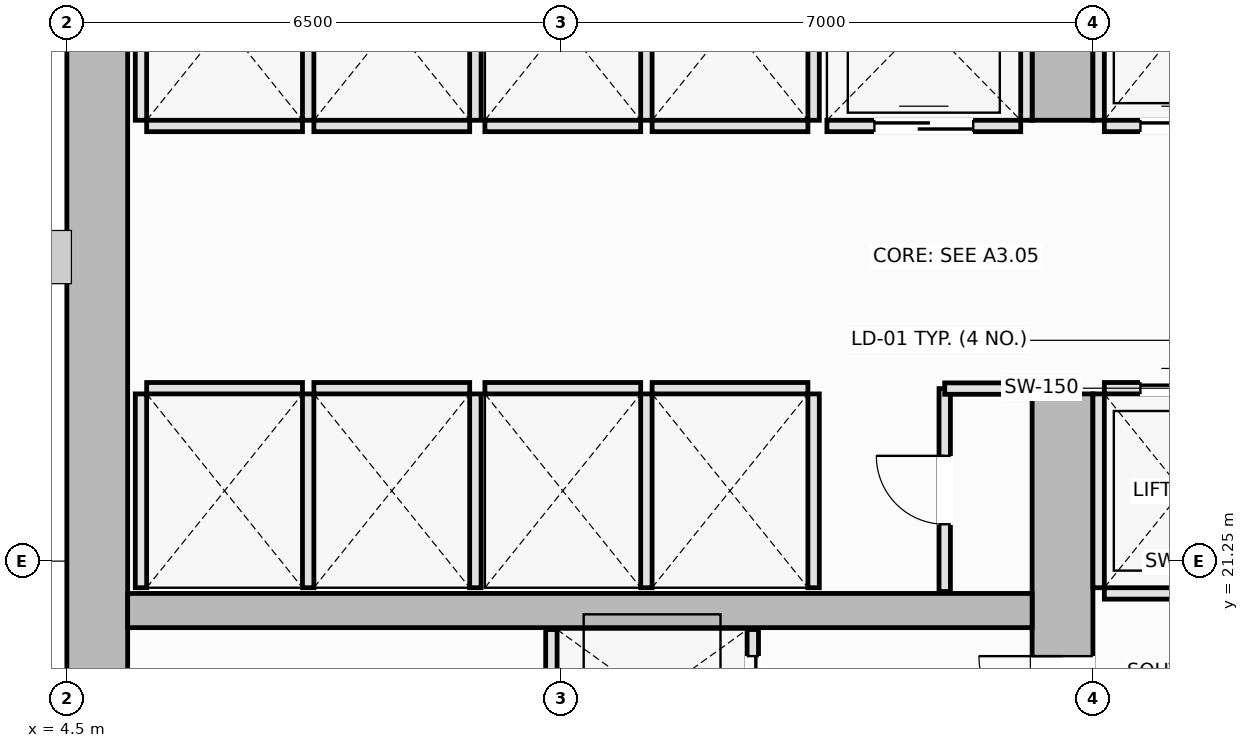
"""IFC4 building model, lengths in metres.
Left out: names, types, materials, properties, quantities, classifications, styles, units other than length and angle.
Written with IfcOpenShell. Run it as: python <this file> out.ifc"""

import sys

from ifc_helpers import new_model, si_unit, direction, frame, frame_2d, origin, place, context, subcontext, project, spatial, rectangle, extrude, element, fill, save


model = new_model("IFC4")
c1 = context("Model", 3, precision=1e-05, world=origin(), true_north=direction((0.0, 1.0)))
c2 = subcontext(c1, "Body", "Model", "MODEL_VIEW")
j1 = project(units=[si_unit("LENGTHUNIT", "METRE"), si_unit("PLANEANGLEUNIT", "RADIAN")], contexts=[c1])
p1 = place(None, origin())
s1 = spatial("IfcSite", under=j1, at=p1, CompositionType="ELEMENT")
p2 = place(p1, origin())
s2 = spatial("IfcBuilding", under=s1, at=p2, CompositionType="ELEMENT")
p3 = place(p2, frame((0.0, 0.0, 75.3)))
s3 = spatial("IfcBuildingStorey", under=s2, at=p3, CompositionType="ELEMENT", Elevation=75.3)
p4 = place(p3, frame((4.9, 14.8, 0.0), z_axis=(0.0, 0.0, 1.0), x_axis=(0.0, 1.0, 0.0)))
e1 = element("IfcWall", 1, at=p4, inside=s3, PredefinedType="SHEAR", context=c2, shape_type="SweptSolid", body=[
    extrude(rectangle(XDim=20.9, YDim=0.8, at=frame_2d((10.45, 0.0))), origin(), (0.0, 0.0, 1.0), 3.55),
])
p5 = place(p3, frame((17.6, 14.8, 0.0), z_axis=(0.0, 0.0, 1.0), x_axis=(0.0, 1.0, 0.0)))
e2 = element("IfcWall", 2, at=p5, inside=s3, PredefinedType="SHEAR", context=c2, shape_type="SweptSolid", body=[
    extrude(rectangle(XDim=8.65, YDim=0.8, at=frame_2d((4.325, 0.0))), origin(), (0.0, 0.0, 1.0), 3.55),
])
p6 = place(p5, frame((4.1, 0.0, 0.0)))
e3 = element("IfcOpeningElement", 3, at=p6, cuts=e2, PredefinedType="OPENING", context=c2, shape_type="SweptSolid", body=[
    extrude(rectangle(XDim=1.1, YDim=2.15, at=frame_2d((0.55, 1.075))), frame((0.0, 0.41, 0.0), z_axis=(0.0, -1.0, 0.0), x_axis=(1.0, 0.0, 0.0)), (0.0, 0.0, 1.0), 0.82),
])
p7 = place(p3, frame((17.6, 27.05, 0.0), z_axis=(0.0, 0.0, 1.0), x_axis=(0.0, 1.0, 0.0)))
e4 = element("IfcWall", 4, at=p7, inside=s3, PredefinedType="SHEAR", context=c2, shape_type="SweptSolid", body=[
    extrude(rectangle(XDim=8.65, YDim=0.8, at=frame_2d((4.325, 0.0))), origin(), (0.0, 0.0, 1.0), 3.55),
])
p8 = place(p7, frame((3.45, 0.0, 0.0)))
e5 = element("IfcOpeningElement", 5, at=p8, cuts=e4, PredefinedType="OPENING", context=c2, shape_type="SweptSolid", body=[
    extrude(rectangle(XDim=1.1, YDim=2.15, at=frame_2d((0.55, 1.075))), frame((0.0, 0.41, 0.0), z_axis=(0.0, -1.0, 0.0), x_axis=(1.0, 0.0, 0.0)), (0.0, 0.0, 1.0), 0.82),
])
p9 = place(p3, frame((5.3, 20.6, 0.0), z_axis=(0.0, 0.0, 1.0), x_axis=(1.0, 0.0, 0.0)))
e6 = element("IfcWall", 6, at=p9, inside=s3, PredefinedType="SHEAR", context=c2, shape_type="SweptSolid", body=[
    extrude(rectangle(XDim=11.9, YDim=0.45, at=frame_2d((5.95, 0.0))), origin(), (0.0, 0.0, 1.0), 3.55),
])
p10 = place(p3, frame((18.15, 20.825, 0.0), z_axis=(0.0, 0.0, 1.0), x_axis=(1.0, 0.0, 0.0)))
e7 = element("IfcWall", 7, at=p10, inside=s3, PredefinedType="PARTITIONING", context=c2, shape_type="SweptSolid", body=[
    extrude(rectangle(XDim=2.05, YDim=0.15, at=frame_2d((1.025, 0.0))), origin(), (0.0, 0.0, 1.0), 3.37),
])
p11 = place(p3, frame((18.15, 23.525, 0.0), z_axis=(0.0, 0.0, 1.0), x_axis=(1.0, 0.0, 0.0)))
e8 = element("IfcWall", 8, at=p11, inside=s3, PredefinedType="PARTITIONING", context=c2, shape_type="SweptSolid", body=[
    extrude(rectangle(XDim=2.05, YDim=0.15, at=frame_2d((1.025, 0.0))), origin(), (0.0, 0.0, 1.0), 3.37),
])
p12 = place(p11, frame((0.475, 0.0, 0.0)))
e9 = element("IfcOpeningElement", 9, at=p12, cuts=e8, PredefinedType="OPENING", context=c2, shape_type="SweptSolid", body=[
    extrude(rectangle(XDim=1.1, YDim=2.2, at=frame_2d((0.55, 1.1))), frame((0.0, 0.085, 0.0), z_axis=(0.0, -1.0, 0.0), x_axis=(1.0, 0.0, 0.0)), (0.0, 0.0, 1.0), 0.17),
])
p13 = place(p3, frame((18.075, 20.9, 0.0), z_axis=(0.0, 0.0, 1.0), x_axis=(0.0, 1.0, 0.0)))
e10 = element("IfcWall", 10, at=p13, inside=s3, PredefinedType="PARTITIONING", context=c2, shape_type="SweptSolid", body=[
    extrude(rectangle(XDim=2.55, YDim=0.15, at=frame_2d((1.275, 0.0))), origin(), (0.0, 0.0, 1.0), 3.37),
])
p14 = place(p3, frame((18.15, 26.975, 0.0), z_axis=(0.0, 0.0, 1.0), x_axis=(1.0, 0.0, 0.0)))
e11 = element("IfcWall", 11, at=p14, inside=s3, PredefinedType="PARTITIONING", context=c2, shape_type="SweptSolid", body=[
    extrude(rectangle(XDim=2.05, YDim=0.15, at=frame_2d((1.025, 0.0))), origin(), (0.0, 0.0, 1.0), 3.37),
])
p15 = place(p14, frame((0.475, 0.0, 0.0)))
e12 = element("IfcOpeningElement", 12, at=p15, cuts=e11, PredefinedType="OPENING", context=c2, shape_type="SweptSolid", body=[
    extrude(rectangle(XDim=1.1, YDim=2.2, at=frame_2d((0.55, 1.1))), frame((0.0, 0.085, 0.0), z_axis=(0.0, -1.0, 0.0), x_axis=(1.0, 0.0, 0.0)), (0.0, 0.0, 1.0), 0.17),
])
p16 = place(p3, frame((18.075, 27.05, 0.0), z_axis=(0.0, 0.0, 1.0), x_axis=(0.0, 1.0, 0.0)))
e13 = element("IfcWall", 13, at=p16, inside=s3, PredefinedType="PARTITIONING", context=c2, shape_type="SweptSolid", body=[
    extrude(rectangle(XDim=2.55, YDim=0.15, at=frame_2d((1.275, 0.0))), origin(), (0.0, 0.0, 1.0), 3.37),
])
p17 = place(p3, frame((5.55, 23.525, 0.0), z_axis=(0.0, 0.0, 1.0), x_axis=(1.0, 0.0, 0.0)))
e14 = element("IfcWall", 14, at=p17, inside=s3, PredefinedType="PARTITIONING", context=c2, shape_type="SweptSolid", body=[
    extrude(rectangle(XDim=2.05, YDim=0.15, at=frame_2d((1.025, 0.0))), origin(), (0.0, 0.0, 1.0), 3.37),
])
for number, where, z_axis, x_axis in (
    (15, (5.475, 20.9, 0.0), (0.0, 0.0, 1.0), (0.0, 1.0, 0.0)),
    (16, (7.675, 20.9, 0.0), (0.0, 0.0, 1.0), (0.0, 1.0, 0.0)),
):
    element("IfcWall", number, at=place(p3, frame(where, z_axis=z_axis, x_axis=x_axis)), inside=s3, PredefinedType="PARTITIONING", context=c2, shape_type="SweptSolid", body=[
        extrude(rectangle(XDim=2.55, YDim=0.15, at=frame_2d((1.275, 0.0))), origin(), (0.0, 0.0, 1.0), 3.37),
    ])
p18 = place(p3, frame((7.75, 23.525, 0.0), z_axis=(0.0, 0.0, 1.0), x_axis=(1.0, 0.0, 0.0)))
e17 = element("IfcWall", 17, at=p18, inside=s3, PredefinedType="PARTITIONING", context=c2, shape_type="SweptSolid", body=[
    extrude(rectangle(XDim=2.05, YDim=0.15, at=frame_2d((1.025, 0.0))), origin(), (0.0, 0.0, 1.0), 3.37),
])
p19 = place(p3, frame((9.875, 20.9, 0.0), z_axis=(0.0, 0.0, 1.0), x_axis=(0.0, 1.0, 0.0)))
e18 = element("IfcWall", 18, at=p19, inside=s3, PredefinedType="PARTITIONING", context=c2, shape_type="SweptSolid", body=[
    extrude(rectangle(XDim=2.55, YDim=0.15, at=frame_2d((1.275, 0.0))), origin(), (0.0, 0.0, 1.0), 3.37),
])
p20 = place(p3, frame((5.55, 26.975, 0.0), z_axis=(0.0, 0.0, 1.0), x_axis=(1.0, 0.0, 0.0)))
e19 = element("IfcWall", 19, at=p20, inside=s3, PredefinedType="PARTITIONING", context=c2, shape_type="SweptSolid", body=[
    extrude(rectangle(XDim=2.05, YDim=0.15, at=frame_2d((1.025, 0.0))), origin(), (0.0, 0.0, 1.0), 3.37),
])
for number, where, z_axis, x_axis in (
    (20, (5.475, 27.05, 0.0), (0.0, 0.0, 1.0), (0.0, 1.0, 0.0)),
    (21, (7.675, 27.05, 0.0), (0.0, 0.0, 1.0), (0.0, 1.0, 0.0)),
):
    element("IfcWall", number, at=place(p3, frame(where, z_axis=z_axis, x_axis=x_axis)), inside=s3, PredefinedType="PARTITIONING", context=c2, shape_type="SweptSolid", body=[
        extrude(rectangle(XDim=2.55, YDim=0.15, at=frame_2d((1.275, 0.0))), origin(), (0.0, 0.0, 1.0), 3.37),
    ])
p21 = place(p3, frame((7.75, 26.975, 0.0), z_axis=(0.0, 0.0, 1.0), x_axis=(1.0, 0.0, 0.0)))
e22 = element("IfcWall", 22, at=p21, inside=s3, PredefinedType="PARTITIONING", context=c2, shape_type="SweptSolid", body=[
    extrude(rectangle(XDim=2.05, YDim=0.15, at=frame_2d((1.025, 0.0))), origin(), (0.0, 0.0, 1.0), 3.37),
])
p22 = place(p3, frame((9.875, 27.05, 0.0), z_axis=(0.0, 0.0, 1.0), x_axis=(0.0, 1.0, 0.0)))
e23 = element("IfcWall", 23, at=p22, inside=s3, PredefinedType="PARTITIONING", context=c2, shape_type="SweptSolid", body=[
    extrude(rectangle(XDim=2.55, YDim=0.15, at=frame_2d((1.275, 0.0))), origin(), (0.0, 0.0, 1.0), 3.37),
])
p23 = place(p3, frame((10.0, 23.525, 0.0), z_axis=(0.0, 0.0, 1.0), x_axis=(1.0, 0.0, 0.0)))
e24 = element("IfcWall", 24, at=p23, inside=s3, PredefinedType="PARTITIONING", context=c2, shape_type="SweptSolid", body=[
    extrude(rectangle(XDim=2.05, YDim=0.15, at=frame_2d((1.025, 0.0))), origin(), (0.0, 0.0, 1.0), 3.37),
])
p24 = place(p3, frame((12.125, 20.9, 0.0), z_axis=(0.0, 0.0, 1.0), x_axis=(0.0, 1.0, 0.0)))
e25 = element("IfcWall", 25, at=p24, inside=s3, PredefinedType="PARTITIONING", context=c2, shape_type="SweptSolid", body=[
    extrude(rectangle(XDim=2.55, YDim=0.15, at=frame_2d((1.275, 0.0))), origin(), (0.0, 0.0, 1.0), 3.37),
])
p25 = place(p3, frame((12.2, 23.525, 0.0), z_axis=(0.0, 0.0, 1.0), x_axis=(1.0, 0.0, 0.0)))
e26 = element("IfcWall", 26, at=p25, inside=s3, PredefinedType="PARTITIONING", context=c2, shape_type="SweptSolid", body=[
    extrude(rectangle(XDim=2.05, YDim=0.15, at=frame_2d((1.025, 0.0))), origin(), (0.0, 0.0, 1.0), 3.37),
])
p26 = place(p3, frame((14.325, 20.9, 0.0), z_axis=(0.0, 0.0, 1.0), x_axis=(0.0, 1.0, 0.0)))
e27 = element("IfcWall", 27, at=p26, inside=s3, PredefinedType="PARTITIONING", context=c2, shape_type="SweptSolid", body=[
    extrude(rectangle(XDim=2.55, YDim=0.15, at=frame_2d((1.275, 0.0))), origin(), (0.0, 0.0, 1.0), 3.37),
])
p27 = place(p3, frame((10.0, 26.975, 0.0), z_axis=(0.0, 0.0, 1.0), x_axis=(1.0, 0.0, 0.0)))
e28 = element("IfcWall", 28, at=p27, inside=s3, PredefinedType="PARTITIONING", context=c2, shape_type="SweptSolid", body=[
    extrude(rectangle(XDim=2.05, YDim=0.15, at=frame_2d((1.025, 0.0))), origin(), (0.0, 0.0, 1.0), 3.37),
])
p28 = place(p3, frame((12.125, 27.05, 0.0), z_axis=(0.0, 0.0, 1.0), x_axis=(0.0, 1.0, 0.0)))
e29 = element("IfcWall", 29, at=p28, inside=s3, PredefinedType="PARTITIONING", context=c2, shape_type="SweptSolid", body=[
    extrude(rectangle(XDim=2.55, YDim=0.15, at=frame_2d((1.275, 0.0))), origin(), (0.0, 0.0, 1.0), 3.37),
])
p29 = place(p3, frame((12.2, 26.975, 0.0), z_axis=(0.0, 0.0, 1.0), x_axis=(1.0, 0.0, 0.0)))
e30 = element("IfcWall", 30, at=p29, inside=s3, PredefinedType="PARTITIONING", context=c2, shape_type="SweptSolid", body=[
    extrude(rectangle(XDim=2.05, YDim=0.15, at=frame_2d((1.025, 0.0))), origin(), (0.0, 0.0, 1.0), 3.37),
])
p30 = place(p3, frame((14.325, 27.05, 0.0), z_axis=(0.0, 0.0, 1.0), x_axis=(0.0, 1.0, 0.0)))
e31 = element("IfcWall", 31, at=p30, inside=s3, PredefinedType="PARTITIONING", context=c2, shape_type="SweptSolid", body=[
    extrude(rectangle(XDim=2.55, YDim=0.15, at=frame_2d((1.275, 0.0))), origin(), (0.0, 0.0, 1.0), 3.37),
])
p31 = place(p3, frame((14.5, 26.975, 0.0), z_axis=(0.0, 0.0, 1.0), x_axis=(1.0, 0.0, 0.0)))
e32 = element("IfcWall", 32, at=p31, inside=s3, PredefinedType="PARTITIONING", context=c2, shape_type="SweptSolid", body=[
    extrude(rectangle(XDim=2.55, YDim=0.15, at=frame_2d((1.275, 0.0))), origin(), (0.0, 0.0, 1.0), 3.37),
])
p32 = place(p31, frame((0.625, 0.0, 0.0)))
e33 = element("IfcOpeningElement", 33, at=p32, cuts=e32, PredefinedType="OPENING", context=c2, shape_type="SweptSolid", body=[
    extrude(rectangle(XDim=1.3, YDim=2.2, at=frame_2d((0.65, 1.1))), frame((0.0, 0.085, 0.0), z_axis=(0.0, -1.0, 0.0), x_axis=(1.0, 0.0, 0.0)), (0.0, 0.0, 1.0), 0.17),
])
p33 = place(p3, frame((17.125, 27.05, 0.0), z_axis=(0.0, 0.0, 1.0), x_axis=(0.0, 1.0, 0.0)))
e34 = element("IfcWall", 34, at=p33, inside=s3, PredefinedType="PARTITIONING", context=c2, shape_type="SweptSolid", body=[
    extrude(rectangle(XDim=2.6, YDim=0.15, at=frame_2d((1.3, 0.0))), origin(), (0.0, 0.0, 1.0), 3.37),
])
p34 = place(p3, frame((10.875, 18.55, 0.0), z_axis=(0.0, 0.0, 1.0), x_axis=(0.0, 1.0, 0.0)))
e35 = element("IfcWall", 35, at=p34, inside=s3, PredefinedType="PARTITIONING", context=c2, shape_type="SweptSolid", body=[
    extrude(rectangle(XDim=1.8, YDim=0.15, at=frame_2d((0.9, 0.0))), origin(), (0.0, 0.0, 1.0), 3.37),
])
p35 = place(p3, frame((13.525, 18.55, 0.0), z_axis=(0.0, 0.0, 1.0), x_axis=(0.0, 1.0, 0.0)))
e36 = element("IfcWall", 36, at=p35, inside=s3, PredefinedType="PARTITIONING", context=c2, shape_type="SweptSolid", body=[
    extrude(rectangle(XDim=1.8, YDim=0.15, at=frame_2d((0.9, 0.0))), origin(), (0.0, 0.0, 1.0), 3.37),
])
p36 = place(p35, frame((0.35, 0.0, 0.0)))
e37 = element("IfcOpeningElement", 37, at=p36, cuts=e36, PredefinedType="OPENING", context=c2, shape_type="SweptSolid", body=[
    extrude(rectangle(XDim=1.1, YDim=2.2, at=frame_2d((0.55, 1.1))), frame((0.0, 0.085, 0.0), z_axis=(0.0, -1.0, 0.0), x_axis=(1.0, 0.0, 0.0)), (0.0, 0.0, 1.0), 0.17),
])
p37 = place(p3, frame((16.05, 20.85, 0.0), z_axis=(0.0, 0.0, 1.0), x_axis=(0.0, 1.0, 0.0)))
e38 = element("IfcWall", 38, at=p37, inside=s3, PredefinedType="PARTITIONING", context=c2, shape_type="SweptSolid", body=[
    extrude(rectangle(XDim=2.67, YDim=0.15, at=frame_2d((1.335, 0.0))), origin(), (0.0, 0.0, 1.0), 3.37),
])
p38 = place(p37, frame((0.885, 0.0, 0.0)))
e39 = element("IfcOpeningElement", 39, at=p38, cuts=e38, PredefinedType="OPENING", context=c2, shape_type="SweptSolid", body=[
    extrude(rectangle(XDim=0.9, YDim=2.1, at=frame_2d((0.45, 1.05))), frame((0.0, 0.085, 0.0), z_axis=(0.0, -1.0, 0.0), x_axis=(1.0, 0.0, 0.0)), (0.0, 0.0, 1.0), 0.17),
])
p39 = place(p3, frame((16.05, 23.52, 0.0), z_axis=(0.0, 0.0, 1.0), x_axis=(1.0, 0.0, 0.0)))
e40 = element("IfcWall", 40, at=p39, inside=s3, PredefinedType="PARTITIONING", context=c2, shape_type="SweptSolid", body=[
    extrude(rectangle(XDim=1.17, YDim=0.15, at=frame_2d((0.585, 0.0))), origin(), (0.0, 0.0, 1.0), 3.37),
])
p40 = place(p12, origin())
e41 = element("IfcDoor", 41, at=p40, inside=s3, OperationType="DOUBLE_DOOR_SLIDING", PredefinedType="DOOR", context=c2, shape_type="SweptSolid", body=[
    extrude(rectangle(XDim=1.1, YDim=2.2, at=frame_2d((0.55, 1.1))), frame((0.0, 0.025, 0.0), z_axis=(0.0, -1.0, 0.0), x_axis=(1.0, 0.0, 0.0)), (0.0, 0.0, 1.0), 0.05),
])
fill(e9, e41)
p41 = place(p15, origin())
e42 = element("IfcDoor", 42, at=p41, inside=s3, OperationType="DOUBLE_DOOR_SLIDING", PredefinedType="DOOR", context=c2, shape_type="SweptSolid", body=[
    extrude(rectangle(XDim=1.1, YDim=2.2, at=frame_2d((0.55, 1.1))), frame((0.0, 0.025, 0.0), z_axis=(0.0, -1.0, 0.0), x_axis=(1.0, 0.0, 0.0)), (0.0, 0.0, 1.0), 0.05),
])
fill(e12, e42)
p42 = place(p32, origin())
e43 = element("IfcDoor", 43, at=p42, inside=s3, OperationType="DOUBLE_DOOR_SLIDING", PredefinedType="DOOR", context=c2, shape_type="SweptSolid", body=[
    extrude(rectangle(XDim=1.3, YDim=2.2, at=frame_2d((0.65, 1.1))), frame((0.0, 0.025, 0.0), z_axis=(0.0, -1.0, 0.0), x_axis=(1.0, 0.0, 0.0)), (0.0, 0.0, 1.0), 0.05),
])
fill(e33, e43)
p43 = place(p36, origin())
e44 = element("IfcDoor", 44, at=p43, inside=s3, OperationType="DOUBLE_DOOR_SLIDING", PredefinedType="DOOR", context=c2, shape_type="SweptSolid", body=[
    extrude(rectangle(XDim=1.1, YDim=2.2, at=frame_2d((0.55, 1.1))), frame((0.0, 0.025, 0.0), z_axis=(0.0, -1.0, 0.0), x_axis=(1.0, 0.0, 0.0)), (0.0, 0.0, 1.0), 0.05),
])
fill(e37, e44)
p44 = place(p6, origin())
e45 = element("IfcDoor", 45, at=p44, inside=s3, OperationType="SINGLE_SWING_RIGHT", PredefinedType="DOOR", context=c2, shape_type="SweptSolid", body=[
    extrude(rectangle(XDim=1.1, YDim=2.15, at=frame_2d((0.55, 1.075))), frame((0.0, 0.025, 0.0), z_axis=(0.0, -1.0, 0.0), x_axis=(1.0, 0.0, 0.0)), (0.0, 0.0, 1.0), 0.05),
])
fill(e3, e45)
p45 = place(p38, origin())
e46 = element("IfcDoor", 46, at=p45, inside=s3, OperationType="SINGLE_SWING_RIGHT", PredefinedType="DOOR", context=c2, shape_type="SweptSolid", body=[
    extrude(rectangle(XDim=0.9, YDim=2.1, at=frame_2d((0.45, 1.05))), frame((0.0, 0.025, 0.0), z_axis=(0.0, -1.0, 0.0), x_axis=(1.0, 0.0, 0.0)), (0.0, 0.0, 1.0), 0.05),
])
fill(e39, e46)
save(model, sys.argv[1])
